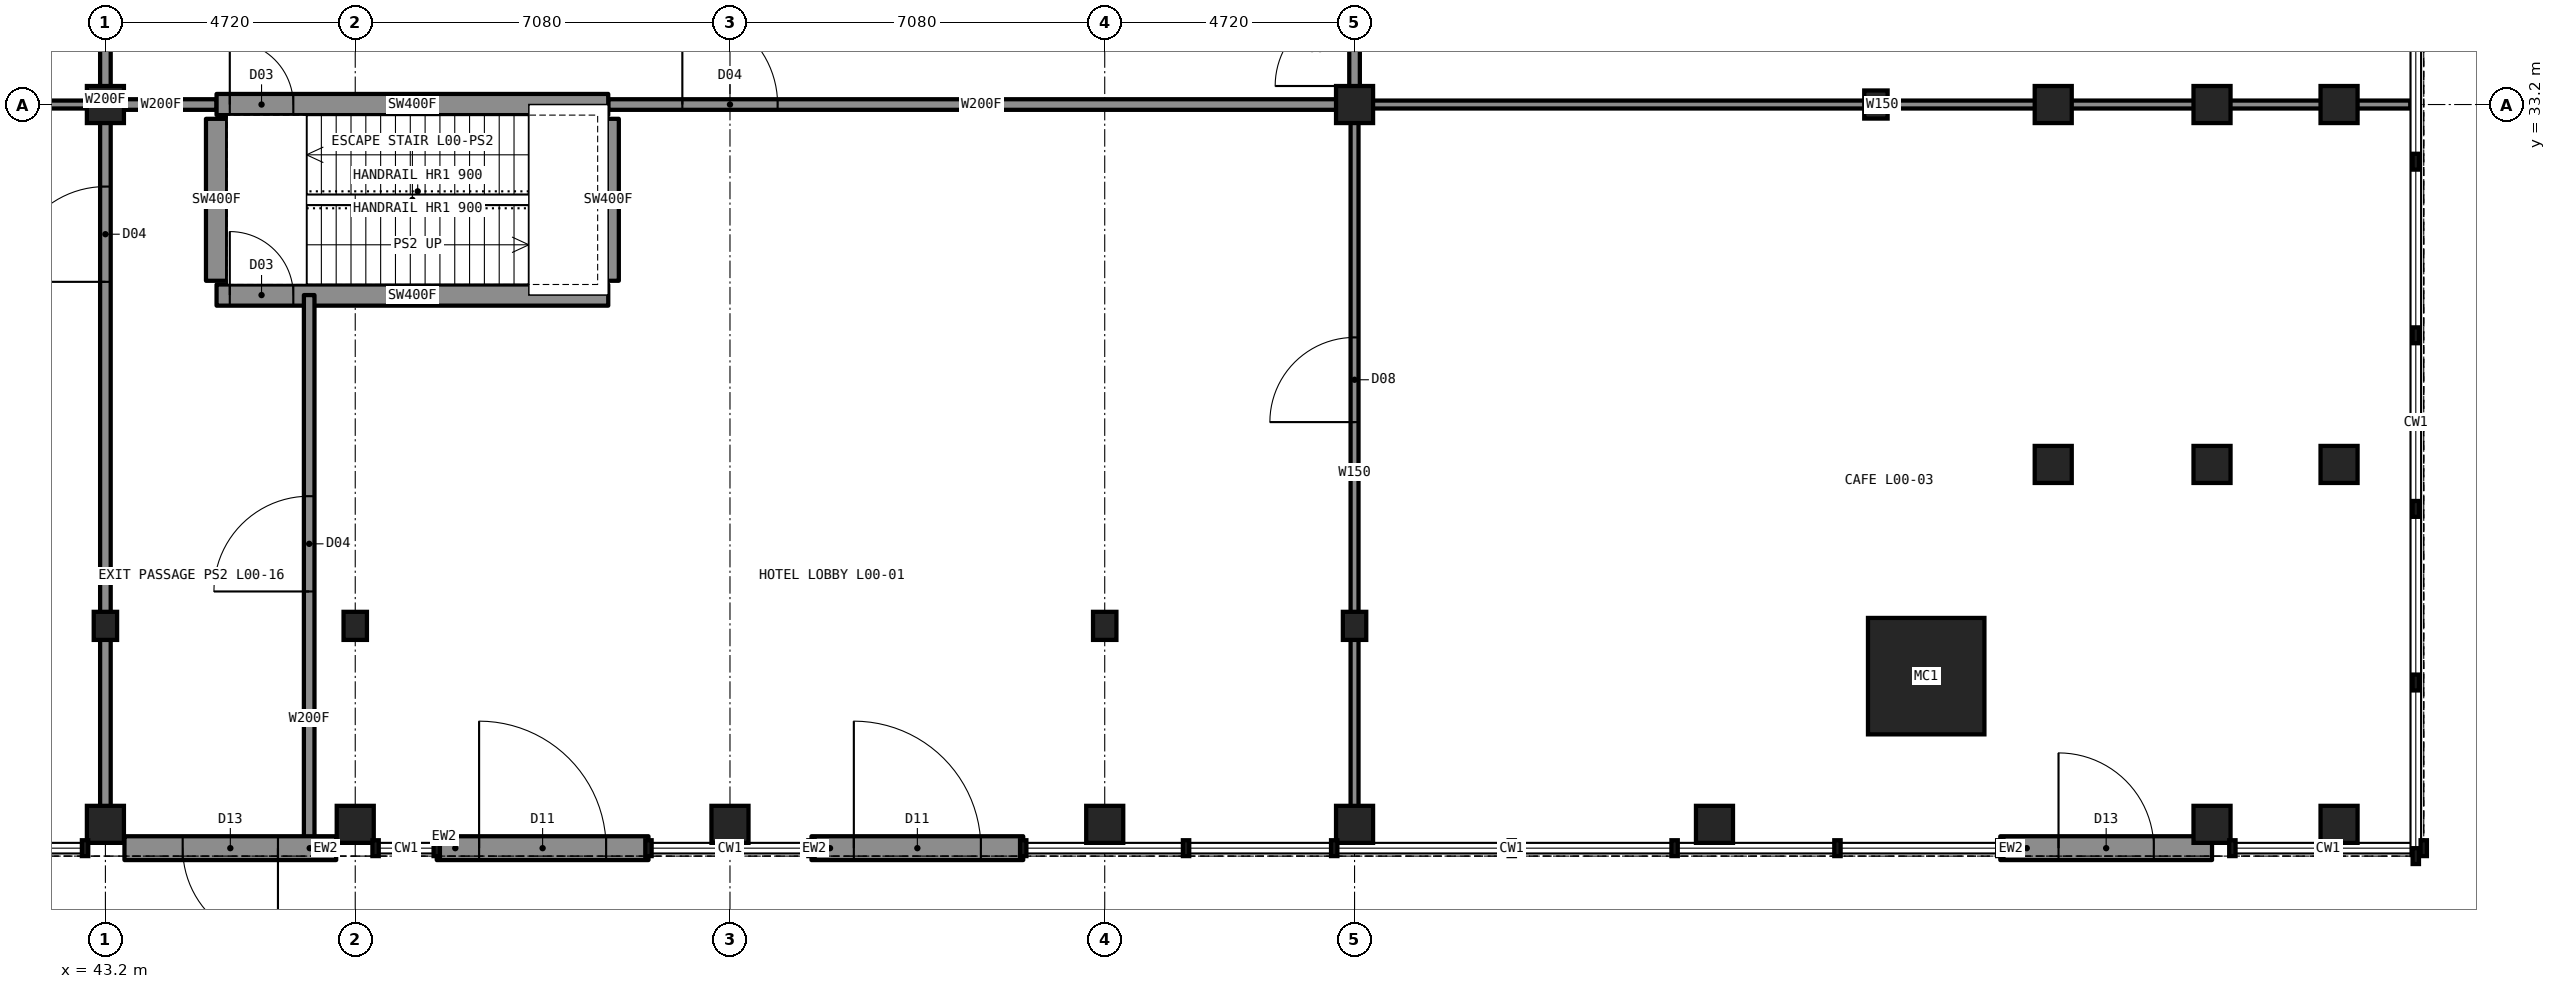
"""IFC4 building model, lengths in metres.
Left out: names, types, materials, properties, quantities, classifications, styles, units other than length and angle.
Written with IfcOpenShell. Run it as: python <this file> out.ifc"""

import sys

from ifc_helpers import new_model, si_unit, direction, frame, frame_2d, origin, origin_2d, place, context, subcontext, project, spatial, rectangle, hollow_rectangle, i_section, extrude, element, fill, save


model = new_model("IFC4")
c1 = context("Model", 3, precision=1e-05, world=origin(), true_north=direction((0.0, 1.0)))
c2 = subcontext(c1, "Body", "Model", "MODEL_VIEW")
j1 = project(units=[si_unit("LENGTHUNIT", "METRE"), si_unit("PLANEANGLEUNIT", "RADIAN")], contexts=[c1])
p1 = place(None, origin())
s1 = spatial("IfcSite", under=j1, at=p1, CompositionType="ELEMENT")
p2 = place(p1, origin())
s2 = spatial("IfcBuilding", under=s1, at=p2, CompositionType="ELEMENT")
p3 = place(p2, origin())
s3 = spatial("IfcBuildingStorey", under=s2, at=p3, CompositionType="ELEMENT", Elevation=0.0)
for number, where, z_axis, x_axis in (
    (1, (43.2, 23.35, 0.0), (0.0, 0.0, 1.0), (1.0, 0.0, 0.0)),
    (2, (47.92, 23.35, 0.0), (0.0, 0.0, 1.0), (1.0, 0.0, 0.0)),
    (3, (62.08, 23.35, 0.0), (0.0, 0.0, 1.0), (1.0, 0.0, 0.0)),
    (4, (66.8, 23.35, 0.0), (0.0, 0.0, 1.0), (1.0, 0.0, 0.0)),
    (5, (76.65, 33.2, 0.0), (0.0, 0.0, 1.0), (1.0, 0.0, 0.0)),
):
    element("IfcColumn", number, at=place(p3, frame(where, z_axis=z_axis, x_axis=x_axis)), inside=s3, PredefinedType="COLUMN", context=c2, shape_type="SweptSolid", body=[
        extrude(i_section(OverallWidth=0.442, OverallDepth=0.531, WebThickness=0.066, FlangeThickness=0.106, at=origin_2d()), origin(), (0.0, 0.0, 1.0), 5.6),
    ])
for number, where, z_axis, x_axis in (
    (6, (43.2, 33.2, 0.0), (0.0, 0.0, 1.0), (1.0, 0.0, 0.0)),
    (7, (66.8, 33.2, 0.0), (0.0, 0.0, 1.0), (1.0, 0.0, 0.0)),
):
    element("IfcColumn", number, at=place(p3, frame(where, z_axis=z_axis, x_axis=x_axis)), inside=s3, PredefinedType="COLUMN", context=c2, shape_type="SweptSolid", body=[
        extrude(hollow_rectangle(XDim=0.7, YDim=0.7, WallThickness=0.06, at=origin_2d()), origin(), (0.0, 0.0, 1.0), 5.6),
    ])
p4 = place(p3, frame((77.6, 22.4, 0.0), z_axis=(0.0, 0.0, 1.0), x_axis=(1.0, 0.0, 0.0)))
e8 = element("IfcColumn", 8, at=p4, inside=s3, PredefinedType="COLUMN", context=c2, shape_type="SweptSolid", body=[
    extrude(hollow_rectangle(XDim=2.2, YDim=2.2, WallThickness=0.15, at=origin_2d()), origin(), (0.0, 0.0, 1.0), 5.6),
])
for number, where, z_axis, x_axis in (
    (9, (43.2, 19.6, 0.0), (0.0, 0.0, 1.0), (1.0, 0.0, 0.0)),
    (10, (47.92, 19.6, 0.0), (0.0, 0.0, 1.0), (1.0, 0.0, 0.0)),
    (11, (55.0, 19.6, 0.0), (0.0, 0.0, 1.0), (1.0, 0.0, 0.0)),
    (12, (62.08, 19.6, 0.0), (0.0, 0.0, 1.0), (1.0, 0.0, 0.0)),
    (13, (66.8, 19.6, 0.0), (0.0, 0.0, 1.0), (1.0, 0.0, 0.0)),
    (14, (73.6, 19.6, 0.0), (0.0, 0.0, 1.0), (1.0, 0.0, 0.0)),
    (15, (80.0, 26.4, 0.0), (0.0, 0.0, 1.0), (1.0, 0.0, 0.0)),
    (16, (80.0, 33.2, 0.0), (0.0, 0.0, 1.0), (1.0, 0.0, 0.0)),
    (17, (83.0, 19.6, 0.0), (0.0, 0.0, 1.0), (1.0, 0.0, 0.0)),
    (18, (83.0, 26.4, 0.0), (0.0, 0.0, 1.0), (1.0, 0.0, 0.0)),
    (19, (83.0, 33.2, 0.0), (0.0, 0.0, 1.0), (1.0, 0.0, 0.0)),
    (20, (85.4, 19.6, 0.0), (0.0, 0.0, 1.0), (1.0, 0.0, 0.0)),
    (21, (85.4, 26.4, 0.0), (0.0, 0.0, 1.0), (1.0, 0.0, 0.0)),
    (22, (85.4, 33.2, 0.0), (0.0, 0.0, 1.0), (1.0, 0.0, 0.0)),
):
    element("IfcColumn", number, at=place(p3, frame(where, z_axis=z_axis, x_axis=x_axis)), inside=s3, PredefinedType="COLUMN", context=c2, shape_type="SweptSolid", body=[
        extrude(rectangle(XDim=0.7, YDim=0.7, at=origin_2d()), origin(), (0.0, 0.0, 1.0), 5.6),
    ])
p5 = place(p3, frame((43.2, 33.2, 0.0), z_axis=(0.0, 0.0, 1.0), x_axis=(1.0, 0.0, 0.0)))
e23 = element("IfcWall", 23, at=p5, inside=s3, PredefinedType="PARTITIONING", context=c2, shape_type="SweptSolid", body=[
    extrude(rectangle(XDim=2.1, YDim=0.2, at=frame_2d((1.05, 0.0))), origin(), (0.0, 0.0, 1.0), 5.25),
])
p6 = place(p3, frame((52.7, 33.2, 0.0), z_axis=(0.0, 0.0, 1.0), x_axis=(1.0, 0.0, 0.0)))
e24 = element("IfcWall", 24, at=p6, inside=s3, PredefinedType="PARTITIONING", context=c2, shape_type="SweptSolid", body=[
    extrude(rectangle(XDim=14.1, YDim=0.2, at=frame_2d((7.05, 0.0))), origin(), (0.0, 0.0, 1.0), 5.25),
])
p7 = place(p6, frame((1.4, 0.0, 0.0)))
e25 = element("IfcOpeningElement", 25, at=p7, cuts=e24, PredefinedType="OPENING", context=c2, shape_type="SweptSolid", body=[
    extrude(rectangle(XDim=1.8, YDim=2.2, at=frame_2d((0.9, 1.1))), frame((0.0, 0.11, 0.0), z_axis=(0.0, -1.0, 0.0), x_axis=(1.0, 0.0, 0.0)), (0.0, 0.0, 1.0), 0.22),
])
p8 = place(p3, frame((23.255, 33.2, 0.0), z_axis=(0.0, 0.0, 1.0), x_axis=(1.0, 0.0, 0.0)))
e26 = element("IfcWall", 26, at=p8, inside=s3, PredefinedType="PARTITIONING", context=c2, shape_type="SweptSolid", body=[
    extrude(rectangle(XDim=19.945, YDim=0.15, at=frame_2d((9.973, 0.0))), origin(), (0.0, 0.0, 1.0), 5.25),
])
p9 = place(p8, frame((4.495, 0.0, 0.0)))
e27 = element("IfcOpeningElement", 27, at=p9, cuts=e26, PredefinedType="OPENING", context=c2, shape_type="SweptSolid", body=[
    extrude(rectangle(XDim=1.6, YDim=2.4, at=frame_2d((0.8, 1.2))), frame((0.0, 0.085, 0.0), z_axis=(0.0, -1.0, 0.0), x_axis=(1.0, 0.0, 0.0)), (0.0, 0.0, 1.0), 0.17),
])
p10 = place(p3, frame((66.8, 33.2, 0.0), z_axis=(0.0, 0.0, 1.0), x_axis=(1.0, 0.0, 0.0)))
e28 = element("IfcWall", 28, at=p10, inside=s3, PredefinedType="PARTITIONING", context=c2, shape_type="SweptSolid", body=[
    extrude(rectangle(XDim=19.945, YDim=0.15, at=frame_2d((9.973, 0.0))), origin(), (0.0, 0.0, 1.0), 5.25),
])
p11 = place(p3, frame((45.3, 33.2, 0.0), z_axis=(0.0, 0.0, 1.0), x_axis=(1.0, 0.0, 0.0)))
e29 = element("IfcWall", 29, at=p11, inside=s3, PredefinedType="SHEAR", context=c2, shape_type="SweptSolid", body=[
    extrude(rectangle(XDim=7.4, YDim=0.4, at=frame_2d((3.7, 0.0))), origin(), (0.0, 0.0, 1.0), 5.6),
])
p12 = place(p11, frame((0.25, 0.0, 0.0)))
e30 = element("IfcOpeningElement", 30, at=p12, cuts=e29, PredefinedType="OPENING", context=c2, shape_type="SweptSolid", body=[
    extrude(rectangle(XDim=1.2, YDim=2.2, at=frame_2d((0.6, 1.1))), frame((0.0, 0.21, 0.0), z_axis=(0.0, -1.0, 0.0), x_axis=(1.0, 0.0, 0.0)), (0.0, 0.0, 1.0), 0.42),
])
p13 = place(p3, frame((45.3, 29.6, 0.0), z_axis=(0.0, 0.0, 1.0), x_axis=(1.0, 0.0, 0.0)))
e31 = element("IfcWall", 31, at=p13, inside=s3, PredefinedType="SHEAR", context=c2, shape_type="SweptSolid", body=[
    extrude(rectangle(XDim=7.4, YDim=0.4, at=frame_2d((3.7, 0.0))), origin(), (0.0, 0.0, 1.0), 5.6),
])
p14 = place(p13, frame((0.25, 0.0, 0.0)))
e32 = element("IfcOpeningElement", 32, at=p14, cuts=e31, PredefinedType="OPENING", context=c2, shape_type="SweptSolid", body=[
    extrude(rectangle(XDim=1.2, YDim=2.2, at=frame_2d((0.6, 1.1))), frame((0.0, 0.21, 0.0), z_axis=(0.0, -1.0, 0.0), x_axis=(1.0, 0.0, 0.0)), (0.0, 0.0, 1.0), 0.42),
])
p15 = place(p3, frame((43.2, 19.3, 0.0), z_axis=(0.0, 0.0, 1.0), x_axis=(0.0, 1.0, 0.0)))
e33 = element("IfcWall", 33, at=p15, inside=s3, PredefinedType="PARTITIONING", context=c2, shape_type="SweptSolid", body=[
    extrude(rectangle(XDim=28.0, YDim=0.2, at=frame_2d((14.0, 0.0))), origin(), (0.0, 0.0, 1.0), 5.25),
])
p16 = place(p15, frame((10.55, 0.0, 0.0)))
e34 = element("IfcOpeningElement", 34, at=p16, cuts=e33, PredefinedType="OPENING", context=c2, shape_type="SweptSolid", body=[
    extrude(rectangle(XDim=1.8, YDim=2.2, at=frame_2d((0.9, 1.1))), frame((0.0, 0.11, 0.0), z_axis=(0.0, -1.0, 0.0), x_axis=(1.0, 0.0, 0.0)), (0.0, 0.0, 1.0), 0.22),
])
p17 = place(p15, frame((26.3, 0.0, 0.0)))
e35 = element("IfcOpeningElement", 35, at=p17, cuts=e33, PredefinedType="OPENING", context=c2, shape_type="SweptSolid", body=[
    extrude(rectangle(XDim=1.0, YDim=2.1, at=frame_2d((0.5, 1.05))), frame((0.0, 0.11, 0.0), z_axis=(0.0, -1.0, 0.0), x_axis=(1.0, 0.0, 0.0)), (0.0, 0.0, 1.0), 0.22),
])
p18 = place(p15, frame((16.35, 0.0, 0.0)))
e36 = element("IfcOpeningElement", 36, at=p18, cuts=e33, PredefinedType="OPENING", context=c2, shape_type="SweptSolid", body=[
    extrude(rectangle(XDim=0.9, YDim=2.1, at=frame_2d((0.45, 1.05))), frame((0.0, 0.11, 0.0), z_axis=(0.0, -1.0, 0.0), x_axis=(1.0, 0.0, 0.0)), (0.0, 0.0, 1.0), 0.22),
])
p19 = place(p15, frame((22.15, 0.0, 0.0)))
e37 = element("IfcOpeningElement", 37, at=p19, cuts=e33, PredefinedType="OPENING", context=c2, shape_type="SweptSolid", body=[
    extrude(rectangle(XDim=0.9, YDim=2.1, at=frame_2d((0.45, 1.05))), frame((0.0, 0.11, 0.0), z_axis=(0.0, -1.0, 0.0), x_axis=(1.0, 0.0, 0.0)), (0.0, 0.0, 1.0), 0.22),
])
p20 = place(p3, frame((52.7, 29.87, 0.0), z_axis=(0.0, 0.0, 1.0), x_axis=(0.0, 1.0, 0.0)))
e38 = element("IfcWall", 38, at=p20, inside=s3, PredefinedType="SHEAR", context=c2, shape_type="SweptSolid", body=[
    extrude(rectangle(XDim=3.06, YDim=0.4, at=frame_2d((1.53, 0.0))), origin(), (0.0, 0.0, 1.0), 5.6),
])
p21 = place(p3, frame((47.05, 19.3, 0.0), z_axis=(0.0, 0.0, 1.0), x_axis=(0.0, 1.0, 0.0)))
e39 = element("IfcWall", 39, at=p21, inside=s3, PredefinedType="PARTITIONING", context=c2, shape_type="SweptSolid", body=[
    extrude(rectangle(XDim=10.3, YDim=0.2, at=frame_2d((5.15, 0.0))), origin(), (0.0, 0.0, 1.0), 5.25),
])
p22 = place(p21, frame((4.7, 0.0, 0.0)))
e40 = element("IfcOpeningElement", 40, at=p22, cuts=e39, PredefinedType="OPENING", context=c2, shape_type="SweptSolid", body=[
    extrude(rectangle(XDim=1.8, YDim=2.2, at=frame_2d((0.9, 1.1))), frame((0.0, 0.11, 0.0), z_axis=(0.0, -1.0, 0.0), x_axis=(1.0, 0.0, 0.0)), (0.0, 0.0, 1.0), 0.22),
])
p23 = place(p3, frame((45.3, 29.87, 0.0), z_axis=(0.0, 0.0, 1.0), x_axis=(0.0, 1.0, 0.0)))
e41 = element("IfcWall", 41, at=p23, inside=s3, PredefinedType="SHEAR", context=c2, shape_type="SweptSolid", body=[
    extrude(rectangle(XDim=3.06, YDim=0.4, at=frame_2d((1.53, 0.0))), origin(), (0.0, 0.0, 1.0), 5.6),
])
p24 = place(p3, frame((66.8, 33.2, 0.0), z_axis=(0.0, 0.0, 1.0), x_axis=(0.0, 1.0, 0.0)))
e42 = element("IfcWall", 42, at=p24, inside=s3, PredefinedType="PARTITIONING", context=c2, shape_type="SweptSolid", body=[
    extrude(rectangle(XDim=2.1, YDim=0.2, at=frame_2d((1.05, 0.0))), origin(), (0.0, 0.0, 1.0), 5.25),
])
p25 = place(p24, frame((0.35, 0.0, 0.0)))
e43 = element("IfcOpeningElement", 43, at=p25, cuts=e42, PredefinedType="OPENING", context=c2, shape_type="SweptSolid", body=[
    extrude(rectangle(XDim=1.5, YDim=2.2, at=frame_2d((0.75, 1.1))), frame((0.0, 0.11, 0.0), z_axis=(0.0, -1.0, 0.0), x_axis=(1.0, 0.0, 0.0)), (0.0, 0.0, 1.0), 0.22),
])
p26 = place(p3, frame((66.8, 19.3, 0.0), z_axis=(0.0, 0.0, 1.0), x_axis=(0.0, 1.0, 0.0)))
e44 = element("IfcWall", 44, at=p26, inside=s3, PredefinedType="PARTITIONING", context=c2, shape_type="SweptSolid", body=[
    extrude(rectangle(XDim=13.9, YDim=0.15, at=frame_2d((6.95, 0.0))), origin(), (0.0, 0.0, 1.0), 5.25),
])
p27 = place(p26, frame((7.9, 0.0, 0.0)))
e45 = element("IfcOpeningElement", 45, at=p27, cuts=e44, PredefinedType="OPENING", context=c2, shape_type="SweptSolid", body=[
    extrude(rectangle(XDim=1.6, YDim=2.4, at=frame_2d((0.8, 1.2))), frame((0.0, 0.085, 0.0), z_axis=(0.0, -1.0, 0.0), x_axis=(1.0, 0.0, 0.0)), (0.0, 0.0, 1.0), 0.17),
])
p28 = place(p3, frame((47.56, 19.15, 0.0), z_axis=(0.0, 0.0, 1.0), x_axis=(-1.0, 0.0, 0.0)))
e46 = element("IfcWall", 46, at=p28, inside=s3, PredefinedType="SOLIDWALL", context=c2, shape_type="SweptSolid", body=[
    extrude(rectangle(XDim=4.0, YDim=0.45, at=frame_2d((2.0, 0.0))), origin(), (0.0, 0.0, 1.0), 5.25),
])
p29 = place(p28, frame((1.1, 0.0, 0.0)))
e47 = element("IfcOpeningElement", 47, at=p29, cuts=e46, PredefinedType="OPENING", context=c2, shape_type="SweptSolid", body=[
    extrude(rectangle(XDim=1.8, YDim=2.4, at=frame_2d((0.9, 1.2))), frame((0.0, 0.235, 0.0), z_axis=(0.0, -1.0, 0.0), x_axis=(1.0, 0.0, 0.0)), (0.0, 0.0, 1.0), 0.47),
])
p30 = place(p3, frame((49.46, 19.15, 0.0), z_axis=(0.0, 0.0, 1.0), x_axis=(1.0, 0.0, 0.0)))
e48 = element("IfcWall", 48, at=p30, inside=s3, PredefinedType="SOLIDWALL", context=c2, shape_type="SweptSolid", body=[
    extrude(rectangle(XDim=4.0, YDim=0.45, at=frame_2d((2.0, 0.0))), origin(), (0.0, 0.0, 1.0), 5.25),
])
p31 = place(p30, frame((0.8, 0.0, 0.0)))
e49 = element("IfcOpeningElement", 49, at=p31, cuts=e48, PredefinedType="OPENING", context=c2, shape_type="SweptSolid", body=[
    extrude(rectangle(XDim=2.4, YDim=3.0, at=frame_2d((1.2, 1.5))), frame((0.0, 0.235, 0.0), z_axis=(0.0, -1.0, 0.0), x_axis=(1.0, 0.0, 0.0)), (0.0, 0.0, 1.0), 0.47),
])
p32 = place(p3, frame((56.54, 19.15, 0.0), z_axis=(0.0, 0.0, 1.0), x_axis=(1.0, 0.0, 0.0)))
e50 = element("IfcWall", 50, at=p32, inside=s3, PredefinedType="SOLIDWALL", context=c2, shape_type="SweptSolid", body=[
    extrude(rectangle(XDim=4.0, YDim=0.45, at=frame_2d((2.0, 0.0))), origin(), (0.0, 0.0, 1.0), 5.25),
])
p33 = place(p32, frame((0.8, 0.0, 0.0)))
e51 = element("IfcOpeningElement", 51, at=p33, cuts=e50, PredefinedType="OPENING", context=c2, shape_type="SweptSolid", body=[
    extrude(rectangle(XDim=2.4, YDim=3.0, at=frame_2d((1.2, 1.5))), frame((0.0, 0.235, 0.0), z_axis=(0.0, -1.0, 0.0), x_axis=(1.0, 0.0, 0.0)), (0.0, 0.0, 1.0), 0.47),
])
p34 = place(p3, frame((79.0, 19.15, 0.0), z_axis=(0.0, 0.0, 1.0), x_axis=(1.0, 0.0, 0.0)))
e52 = element("IfcWall", 52, at=p34, inside=s3, PredefinedType="SOLIDWALL", context=c2, shape_type="SweptSolid", body=[
    extrude(rectangle(XDim=4.0, YDim=0.45, at=frame_2d((2.0, 0.0))), origin(), (0.0, 0.0, 1.0), 5.25),
])
p35 = place(p34, frame((1.1, 0.0, 0.0)))
e53 = element("IfcOpeningElement", 53, at=p35, cuts=e52, PredefinedType="OPENING", context=c2, shape_type="SweptSolid", body=[
    extrude(rectangle(XDim=1.8, YDim=2.4, at=frame_2d((0.9, 1.2))), frame((0.0, 0.235, 0.0), z_axis=(0.0, -1.0, 0.0), x_axis=(1.0, 0.0, 0.0)), (0.0, 0.0, 1.0), 0.47),
])
p36 = place(p12, origin())
e54 = element("IfcDoor", 54, at=p36, inside=s3, OperationType="SINGLE_SWING_LEFT", PredefinedType="DOOR", context=c2, shape_type="SweptSolid", body=[
    extrude(rectangle(XDim=1.2, YDim=2.2, at=frame_2d((0.6, 1.1))), frame((0.0, 0.025, 0.0), z_axis=(0.0, -1.0, 0.0), x_axis=(1.0, 0.0, 0.0)), (0.0, 0.0, 1.0), 0.05),
])
fill(e30, e54)
p37 = place(p14, origin())
e55 = element("IfcDoor", 55, at=p37, inside=s3, OperationType="SINGLE_SWING_LEFT", PredefinedType="DOOR", context=c2, shape_type="SweptSolid", body=[
    extrude(rectangle(XDim=1.2, YDim=2.2, at=frame_2d((0.6, 1.1))), frame((0.0, 0.025, 0.0), z_axis=(0.0, -1.0, 0.0), x_axis=(1.0, 0.0, 0.0)), (0.0, 0.0, 1.0), 0.05),
])
fill(e32, e55)
p38 = place(p7, origin())
e56 = element("IfcDoor", 56, at=p38, inside=s3, OperationType="DOUBLE_DOOR_SINGLE_SWING", PredefinedType="DOOR", context=c2, shape_type="SweptSolid", body=[
    extrude(rectangle(XDim=1.8, YDim=2.2, at=frame_2d((0.9, 1.1))), frame((0.0, 0.025, 0.0), z_axis=(0.0, -1.0, 0.0), x_axis=(1.0, 0.0, 0.0)), (0.0, 0.0, 1.0), 0.05),
])
fill(e25, e56)
p39 = place(p16, origin())
e57 = element("IfcDoor", 57, at=p39, inside=s3, OperationType="DOUBLE_DOOR_SINGLE_SWING", PredefinedType="DOOR", context=c2, shape_type="SweptSolid", body=[
    extrude(rectangle(XDim=1.8, YDim=2.2, at=frame_2d((0.9, 1.1))), frame((0.0, 0.025, 0.0), z_axis=(0.0, -1.0, 0.0), x_axis=(1.0, 0.0, 0.0)), (0.0, 0.0, 1.0), 0.05),
])
fill(e34, e57)
p40 = place(p27, origin())
e58 = element("IfcDoor", 58, at=p40, inside=s3, OperationType="DOUBLE_DOOR_SINGLE_SWING", PredefinedType="DOOR", context=c2, shape_type="SweptSolid", body=[
    extrude(rectangle(XDim=1.6, YDim=2.4, at=frame_2d((0.8, 1.2))), frame((0.0, 0.025, 0.0), z_axis=(0.0, -1.0, 0.0), x_axis=(1.0, 0.0, 0.0)), (0.0, 0.0, 1.0), 0.05),
])
fill(e45, e58)
p41 = place(p25, origin())
e59 = element("IfcDoor", 59, at=p41, inside=s3, OperationType="DOUBLE_DOOR_SINGLE_SWING", PredefinedType="DOOR", context=c2, shape_type="SweptSolid", body=[
    extrude(rectangle(XDim=1.5, YDim=2.2, at=frame_2d((0.75, 1.1))), frame((0.0, 0.025, 0.0), z_axis=(0.0, -1.0, 0.0), x_axis=(1.0, 0.0, 0.0)), (0.0, 0.0, 1.0), 0.05),
])
fill(e43, e59)
p42 = place(p22, origin())
e60 = element("IfcDoor", 60, at=p42, inside=s3, OperationType="DOUBLE_DOOR_SINGLE_SWING", PredefinedType="DOOR", context=c2, shape_type="SweptSolid", body=[
    extrude(rectangle(XDim=1.8, YDim=2.2, at=frame_2d((0.9, 1.1))), frame((0.0, 0.025, 0.0), z_axis=(0.0, -1.0, 0.0), x_axis=(1.0, 0.0, 0.0)), (0.0, 0.0, 1.0), 0.05),
])
fill(e40, e60)
p43 = place(p29, origin())
e61 = element("IfcDoor", 61, at=p43, inside=s3, OperationType="DOUBLE_DOOR_SINGLE_SWING", PredefinedType="DOOR", context=c2, shape_type="SweptSolid", body=[
    extrude(rectangle(XDim=1.8, YDim=2.4, at=frame_2d((0.9, 1.2))), frame((0.0, 0.025, 0.0), z_axis=(0.0, -1.0, 0.0), x_axis=(1.0, 0.0, 0.0)), (0.0, 0.0, 1.0), 0.05),
])
fill(e47, e61)
p44 = place(p31, origin())
e62 = element("IfcDoor", 62, at=p44, inside=s3, OperationType="DOUBLE_DOOR_SINGLE_SWING", PredefinedType="DOOR", context=c2, shape_type="SweptSolid", body=[
    extrude(rectangle(XDim=2.4, YDim=3.0, at=frame_2d((1.2, 1.5))), frame((0.0, 0.025, 0.0), z_axis=(0.0, -1.0, 0.0), x_axis=(1.0, 0.0, 0.0)), (0.0, 0.0, 1.0), 0.05),
])
fill(e49, e62)
p45 = place(p33, origin())
e63 = element("IfcDoor", 63, at=p45, inside=s3, OperationType="DOUBLE_DOOR_SINGLE_SWING", PredefinedType="DOOR", context=c2, shape_type="SweptSolid", body=[
    extrude(rectangle(XDim=2.4, YDim=3.0, at=frame_2d((1.2, 1.5))), frame((0.0, 0.025, 0.0), z_axis=(0.0, -1.0, 0.0), x_axis=(1.0, 0.0, 0.0)), (0.0, 0.0, 1.0), 0.05),
])
fill(e51, e63)
p46 = place(p35, origin())
e64 = element("IfcDoor", 64, at=p46, inside=s3, OperationType="DOUBLE_DOOR_SINGLE_SWING", PredefinedType="DOOR", context=c2, shape_type="SweptSolid", body=[
    extrude(rectangle(XDim=1.8, YDim=2.4, at=frame_2d((0.9, 1.2))), frame((0.0, 0.025, 0.0), z_axis=(0.0, -1.0, 0.0), x_axis=(1.0, 0.0, 0.0)), (0.0, 0.0, 1.0), 0.05),
])
fill(e53, e64)
save(model, sys.argv[1])
